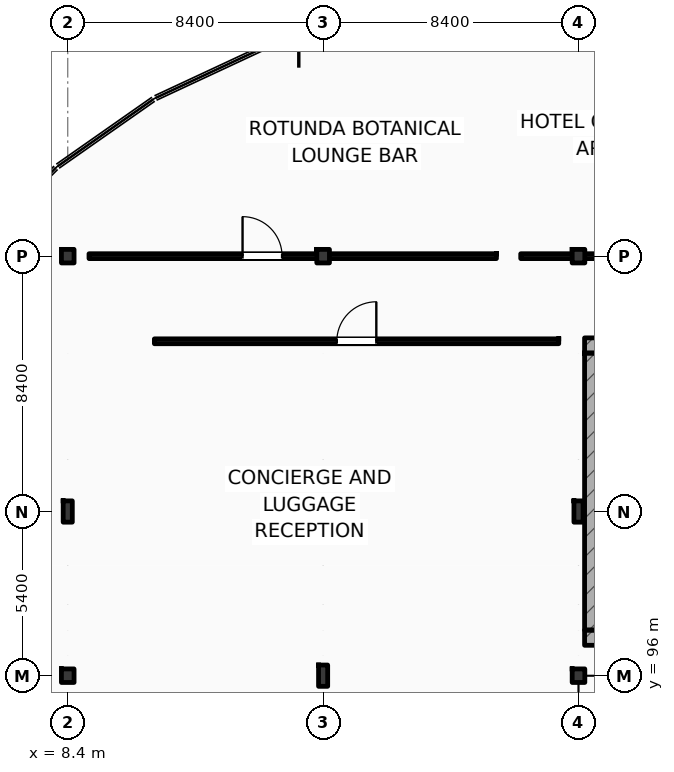
"""IFC4 building model, lengths in metres.
Left out: names, types, materials, properties, quantities, classifications, styles, units other than length and angle.
Written with IfcOpenShell. Run it as: python <this file> out.ifc"""

import sys

from ifc_helpers import new_model, si_unit, direction, frame, frame_2d, origin, origin_2d, place, context, subcontext, project, spatial, rectangle, i_section, extrude, element, fill, save


model = new_model("IFC4")
c1 = context("Model", 3, precision=1e-05, world=origin(), true_north=direction((0.0, 1.0)))
c2 = subcontext(c1, "Body", "Model", "MODEL_VIEW")
j1 = project(units=[si_unit("LENGTHUNIT", "METRE"), si_unit("PLANEANGLEUNIT", "RADIAN")], contexts=[c1])
p1 = place(None, origin())
s1 = spatial("IfcSite", under=j1, at=p1, CompositionType="ELEMENT")
p2 = place(p1, origin())
s2 = spatial("IfcBuilding", under=s1, at=p2, CompositionType="ELEMENT")
p3 = place(p2, origin())
s3 = spatial("IfcBuildingStorey", under=s2, at=p3, CompositionType="ELEMENT", Elevation=0.0)
p4 = place(p3, frame((8.4, 96.0, 0.0), z_axis=(0.0, 0.0, 1.0), x_axis=(1.0, 0.0, 0.0)))
e1 = element("IfcColumn", 1, at=p4, inside=s3, PredefinedType="COLUMN", context=c2, shape_type="SweptSolid", body=[
    extrude(i_section(OverallWidth=0.416, OverallDepth=0.446, WebThickness=0.036, FlangeThickness=0.048, FilletRadius=0.015, at=origin_2d()), origin(), (0.0, 0.0, 1.0), 6.0),
])
p5 = place(p3, frame((16.8, 96.0, 0.0), z_axis=(0.0, 0.0, 1.0), x_axis=(1.0, 0.0, 0.0)))
e2 = element("IfcColumn", 2, at=p5, inside=s3, PredefinedType="COLUMN", context=c2, shape_type="SweptSolid", body=[
    extrude(i_section(OverallWidth=0.3, OverallDepth=0.7, WebThickness=0.017, FlangeThickness=0.032, FilletRadius=0.027, at=origin_2d()), origin(), (0.0, 0.0, 1.0), 6.0),
])
p6 = place(p3, frame((25.2, 96.0, 0.0), z_axis=(0.0, 0.0, 1.0), x_axis=(1.0, 0.0, 0.0)))
e3 = element("IfcColumn", 3, at=p6, inside=s3, PredefinedType="COLUMN", context=c2, shape_type="SweptSolid", body=[
    extrude(i_section(OverallWidth=0.416, OverallDepth=0.446, WebThickness=0.036, FlangeThickness=0.048, FilletRadius=0.015, at=origin_2d()), origin(), (0.0, 0.0, 1.0), 6.0),
])
p7 = place(p3, frame((8.4, 101.4, 0.0), z_axis=(0.0, 0.0, 1.0), x_axis=(1.0, 0.0, 0.0)))
e4 = element("IfcColumn", 4, at=p7, inside=s3, PredefinedType="COLUMN", context=c2, shape_type="SweptSolid", body=[
    extrude(i_section(OverallWidth=0.3, OverallDepth=0.7, WebThickness=0.017, FlangeThickness=0.032, FilletRadius=0.027, at=origin_2d()), origin(), (0.0, 0.0, 1.0), 6.0),
])
p8 = place(p3, frame((8.4, 109.8, 0.0), z_axis=(0.0, 0.0, 1.0), x_axis=(1.0, 0.0, 0.0)))
e5 = element("IfcColumn", 5, at=p8, inside=s3, PredefinedType="COLUMN", context=c2, shape_type="SweptSolid", body=[
    extrude(i_section(OverallWidth=0.416, OverallDepth=0.446, WebThickness=0.036, FlangeThickness=0.048, FilletRadius=0.015, at=origin_2d()), origin(), (0.0, 0.0, 1.0), 6.0),
])
p9 = place(p3, frame((16.8, 101.4, 0.0), z_axis=(0.0, 0.0, 1.0), x_axis=(1.0, 0.0, 0.0)))
e6 = element("IfcColumn", 6, at=p9, inside=s3, PredefinedType="COLUMN", context=c2, shape_type="SweptSolid", body=[
    extrude(i_section(OverallWidth=0.3, OverallDepth=0.7, WebThickness=0.017, FlangeThickness=0.032, FilletRadius=0.027, at=origin_2d()), origin(), (0.0, 0.0, 1.0), 6.0),
])
p10 = place(p3, frame((16.8, 109.8, 0.0), z_axis=(0.0, 0.0, 1.0), x_axis=(1.0, 0.0, 0.0)))
e7 = element("IfcColumn", 7, at=p10, inside=s3, PredefinedType="COLUMN", context=c2, shape_type="SweptSolid", body=[
    extrude(i_section(OverallWidth=0.416, OverallDepth=0.446, WebThickness=0.036, FlangeThickness=0.048, FilletRadius=0.015, at=origin_2d()), origin(), (0.0, 0.0, 1.0), 6.0),
])
p11 = place(p3, frame((25.2, 101.4, 0.0), z_axis=(0.0, 0.0, 1.0), x_axis=(1.0, 0.0, 0.0)))
e8 = element("IfcColumn", 8, at=p11, inside=s3, PredefinedType="COLUMN", context=c2, shape_type="SweptSolid", body=[
    extrude(i_section(OverallWidth=0.3, OverallDepth=0.7, WebThickness=0.017, FlangeThickness=0.032, FilletRadius=0.027, at=origin_2d()), origin(), (0.0, 0.0, 1.0), 6.0),
])
p12 = place(p3, frame((25.2, 109.8, 0.0), z_axis=(0.0, 0.0, 1.0), x_axis=(1.0, 0.0, 0.0)))
e9 = element("IfcColumn", 9, at=p12, inside=s3, PredefinedType="COLUMN", context=c2, shape_type="SweptSolid", body=[
    extrude(i_section(OverallWidth=0.416, OverallDepth=0.446, WebThickness=0.036, FlangeThickness=0.048, FilletRadius=0.015, at=origin_2d()), origin(), (0.0, 0.0, 1.0), 6.0),
])
for number, where, z_axis, x_axis in (
    (10, (25.4, 106.862, 0.0), (0.0, 0.0, 1.0), (1.0, 0.0, 0.0)),
    (11, (25.4, 97.25, 0.0), (0.0, 0.0, 1.0), (1.0, 0.0, 0.0)),
):
    element("IfcWall", number, at=place(p3, frame(where, z_axis=z_axis, x_axis=x_axis)), inside=s3, PredefinedType="SHEAR", context=c2, shape_type="SweptSolid", body=[
        extrude(rectangle(XDim=5.16, YDim=0.5, at=frame_2d((2.58, 0.0))), origin(), (0.0, 0.0, 1.0), 6.0),
    ])
p13 = place(p3, frame((25.65, 97.5, 0.0), z_axis=(0.0, 0.0, 1.0), x_axis=(0.0, 1.0, 0.0)))
e12 = element("IfcWall", 12, at=p13, inside=s3, PredefinedType="SHEAR", context=c2, shape_type="SweptSolid", body=[
    extrude(rectangle(XDim=9.112, YDim=0.5, at=frame_2d((4.556, 0.0))), origin(), (0.0, 0.0, 1.0), 6.0),
])
p14 = place(p3, frame((23.3, 109.8, 0.0), z_axis=(0.0, 0.0, 1.0), x_axis=(1.0, 0.0, 0.0)))
e13 = element("IfcWall", 13, at=p14, inside=s3, PredefinedType="PARTITIONING", context=c2, shape_type="SweptSolid", body=[
    extrude(rectangle(XDim=40.8, YDim=0.16, at=frame_2d((20.4, 0.0))), origin(), (0.0, 0.0, 1.0), 5.14),
])
p15 = place(p14, frame((19.4, 0.0, 0.0)))
e14 = element("IfcOpeningElement", 14, at=p15, cuts=e13, PredefinedType="OPENING", context=c2, shape_type="SweptSolid", body=[
    extrude(rectangle(XDim=2.0, YDim=2.5, at=frame_2d((1.0, 1.25))), frame((0.0, 0.09, 0.0), z_axis=(0.0, -1.0, 0.0), x_axis=(1.0, 0.0, 0.0)), (0.0, 0.0, 1.0), 0.18),
])
p16 = place(p3, frame((11.25, 107.0, 0.0), z_axis=(0.0, 0.0, 1.0), x_axis=(1.0, 0.0, 0.0)))
e15 = element("IfcWall", 15, at=p16, inside=s3, PredefinedType="PARTITIONING", context=c2, shape_type="SweptSolid", body=[
    extrude(rectangle(XDim=13.3, YDim=0.16, at=frame_2d((6.65, 0.0))), origin(), (0.0, 0.0, 1.0), 5.7),
])
p17 = place(p16, frame((6.0, 0.0, 0.0)))
e16 = element("IfcOpeningElement", 16, at=p17, cuts=e15, PredefinedType="OPENING", context=c2, shape_type="SweptSolid", body=[
    extrude(rectangle(XDim=1.3, YDim=2.2, at=frame_2d((0.65, 1.1))), frame((0.0, 0.09, 0.0), z_axis=(0.0, -1.0, 0.0), x_axis=(1.0, 0.0, 0.0)), (0.0, 0.0, 1.0), 0.18),
])
p18 = place(p3, frame((9.1, 109.8, 0.0), z_axis=(0.0, 0.0, 1.0), x_axis=(1.0, 0.0, 0.0)))
e17 = element("IfcWall", 17, at=p18, inside=s3, PredefinedType="PARTITIONING", context=c2, shape_type="SweptSolid", body=[
    extrude(rectangle(XDim=13.4, YDim=0.16, at=frame_2d((6.7, 0.0))), origin(), (0.0, 0.0, 1.0), 5.14),
])
p19 = place(p18, frame((5.05, 0.0, 0.0)))
e18 = element("IfcOpeningElement", 18, at=p19, cuts=e17, PredefinedType="OPENING", context=c2, shape_type="SweptSolid", body=[
    extrude(rectangle(XDim=1.3, YDim=2.2, at=frame_2d((0.65, 1.1))), frame((0.0, 0.09, 0.0), z_axis=(0.0, -1.0, 0.0), x_axis=(1.0, 0.0, 0.0)), (0.0, 0.0, 1.0), 0.18),
])
p20 = place(p17, origin())
e19 = element("IfcDoor", 19, at=p20, inside=s3, OperationType="SINGLE_SWING_RIGHT", PredefinedType="DOOR", context=c2, shape_type="SweptSolid", body=[
    extrude(rectangle(XDim=1.3, YDim=2.2, at=frame_2d((0.65, 1.1))), frame((0.0, 0.025, 0.0), z_axis=(0.0, -1.0, 0.0), x_axis=(1.0, 0.0, 0.0)), (0.0, 0.0, 1.0), 0.05),
])
fill(e16, e19)
p21 = place(p19, origin())
e20 = element("IfcDoor", 20, at=p21, inside=s3, OperationType="SINGLE_SWING_LEFT", PredefinedType="DOOR", context=c2, shape_type="SweptSolid", body=[
    extrude(rectangle(XDim=1.3, YDim=2.2, at=frame_2d((0.65, 1.1))), frame((0.0, 0.025, 0.0), z_axis=(0.0, -1.0, 0.0), x_axis=(1.0, 0.0, 0.0)), (0.0, 0.0, 1.0), 0.05),
])
fill(e18, e20)
save(model, sys.argv[1])
